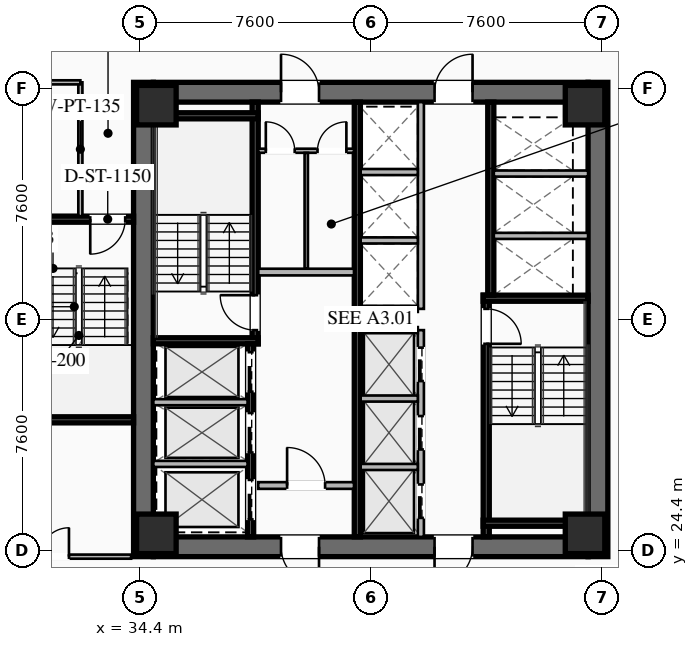
"""IFC4 building model, lengths in metres.
Left out: names, types, materials, properties, quantities, classifications, styles, units other than length and angle.
Written with IfcOpenShell. Run it as: python <this file> out.ifc"""

import sys

from ifc_helpers import new_model, si_unit, direction, frame, frame_2d, origin, origin_2d, place, context, subcontext, project, spatial, rectangle, hollow_rectangle, extrude, element, fill, save


model = new_model("IFC4")
c1 = context("Model", 3, precision=1e-05, world=origin(), true_north=direction((0.0, 1.0)))
c2 = subcontext(c1, "Body", "Model", "MODEL_VIEW")
j1 = project(units=[si_unit("LENGTHUNIT", "METRE"), si_unit("PLANEANGLEUNIT", "RADIAN")], contexts=[c1])
p1 = place(None, origin())
s1 = spatial("IfcSite", under=j1, at=p1, CompositionType="ELEMENT")
p2 = place(p1, origin())
s2 = spatial("IfcBuilding", under=s1, at=p2, CompositionType="ELEMENT")
p3 = place(p2, frame((0.0, 0.0, 95.6)))
s3 = spatial("IfcBuildingStorey", under=s2, at=p3, CompositionType="ELEMENT", Elevation=95.6)
for number, where, z_axis, x_axis in (
    (1, (34.525, 24.2, 0.0), (0.0, 0.0, 1.0), (0.0, 1.0, 0.0)),
    (2, (49.475, 39.8, 0.0), (0.0, 0.0, 1.0), (0.0, -1.0, 0.0)),
):
    element("IfcWall", number, at=place(p3, frame(where, z_axis=z_axis, x_axis=x_axis)), inside=s3, PredefinedType="SHEAR", context=c2, shape_type="SweptSolid", body=[
        extrude(rectangle(XDim=15.6, YDim=0.65, at=frame_2d((7.8, 0.0))), origin(), (0.0, 0.0, 1.0), 3.55),
    ])
p4 = place(p3, frame((49.15, 24.525, 0.0), z_axis=(0.0, 0.0, 1.0), x_axis=(-1.0, 0.0, 0.0)))
e3 = element("IfcWall", 3, at=p4, inside=s3, PredefinedType="SHEAR", context=c2, shape_type="SweptSolid", body=[
    extrude(rectangle(XDim=14.3, YDim=0.65, at=frame_2d((7.15, 0.0))), origin(), (0.0, 0.0, 1.0), 3.55),
])
p5 = place(p4, frame((8.85, 0.0, 0.0)))
e4 = element("IfcOpeningElement", 4, at=p5, cuts=e3, PredefinedType="OPENING", context=c2, shape_type="SweptSolid", body=[
    extrude(rectangle(XDim=1.25, YDim=2.25, at=frame_2d((0.625, 1.125))), frame((0.0, 0.335, 0.0), z_axis=(0.0, -1.0, 0.0), x_axis=(1.0, 0.0, 0.0)), (0.0, 0.0, 1.0), 0.67),
])
p6 = place(p4, frame((3.8, 0.0, 0.0)))
e5 = element("IfcOpeningElement", 5, at=p6, cuts=e3, PredefinedType="OPENING", context=c2, shape_type="SweptSolid", body=[
    extrude(rectangle(XDim=1.25, YDim=2.25, at=frame_2d((0.625, 1.125))), frame((0.0, 0.335, 0.0), z_axis=(0.0, -1.0, 0.0), x_axis=(1.0, 0.0, 0.0)), (0.0, 0.0, 1.0), 0.67),
])
p7 = place(p3, frame((34.85, 39.475, 0.0), z_axis=(0.0, 0.0, 1.0), x_axis=(1.0, 0.0, 0.0)))
e6 = element("IfcWall", 6, at=p7, inside=s3, PredefinedType="SHEAR", context=c2, shape_type="SweptSolid", body=[
    extrude(rectangle(XDim=14.3, YDim=0.65, at=frame_2d((7.15, 0.0))), origin(), (0.0, 0.0, 1.0), 3.55),
])
p8 = place(p7, frame((4.2, 0.0, 0.0)))
e7 = element("IfcOpeningElement", 7, at=p8, cuts=e6, PredefinedType="OPENING", context=c2, shape_type="SweptSolid", body=[
    extrude(rectangle(XDim=1.25, YDim=2.25, at=frame_2d((0.625, 1.125))), frame((0.0, 0.335, 0.0), z_axis=(0.0, -1.0, 0.0), x_axis=(1.0, 0.0, 0.0)), (0.0, 0.0, 1.0), 0.67),
])
p9 = place(p7, frame((9.25, 0.0, 0.0)))
e8 = element("IfcOpeningElement", 8, at=p9, cuts=e6, PredefinedType="OPENING", context=c2, shape_type="SweptSolid", body=[
    extrude(rectangle(XDim=1.25, YDim=2.25, at=frame_2d((0.625, 1.125))), frame((0.0, 0.335, 0.0), z_axis=(0.0, -1.0, 0.0), x_axis=(1.0, 0.0, 0.0)), (0.0, 0.0, 1.0), 0.67),
])
for number, where, z_axis, x_axis in (
    (9, (34.95, 24.95, 0.0), (0.0, 0.0, 1.0), (1.0, 0.0, 0.0)),
    (10, (49.05, 24.95, 0.0), (0.0, 0.0, 1.0), (1.0, 0.0, 0.0)),
    (11, (49.05, 39.05, 0.0), (0.0, 0.0, 1.0), (1.0, 0.0, 0.0)),
    (12, (34.95, 39.05, 0.0), (0.0, 0.0, 1.0), (1.0, 0.0, 0.0)),
):
    element("IfcColumn", number, at=place(p3, frame(where, z_axis=z_axis, x_axis=x_axis)), inside=s3, PredefinedType="COLUMN", context=c2, shape_type="SweptSolid", body=[
        extrude(hollow_rectangle(XDim=1.3, YDim=1.3, WallThickness=0.05, at=origin_2d()), origin(), (0.0, 0.0, 1.0), 3.35),
    ])
p10 = place(p3, frame((38.2, 31.2, 0.0), z_axis=(0.0, 0.0, 1.0), x_axis=(0.0, 1.0, 0.0)))
e13 = element("IfcWall", 13, at=p10, inside=s3, PredefinedType="SHEAR", context=c2, shape_type="SweptSolid", body=[
    extrude(rectangle(XDim=7.95, YDim=0.2, at=frame_2d((3.975, 0.0))), origin(), (0.0, 0.0, 1.0), 3.35),
])
p11 = place(p10, frame((0.45, 0.0, 0.0)))
e14 = element("IfcOpeningElement", 14, at=p11, cuts=e13, PredefinedType="OPENING", context=c2, shape_type="SweptSolid", body=[
    extrude(rectangle(XDim=1.15, YDim=2.2, at=frame_2d((0.575, 1.1))), frame((0.0, 0.11, 0.0), z_axis=(0.0, -1.0, 0.0), x_axis=(1.0, 0.0, 0.0)), (0.0, 0.0, 1.0), 0.22),
])
for number, where, z_axis, x_axis in (
    (15, (34.85, 31.3, 0.0), (0.0, 0.0, 1.0), (1.0, 0.0, 0.0)),
    (16, (34.85, 38.7, 0.0), (0.0, 0.0, 1.0), (1.0, 0.0, 0.0)),
):
    element("IfcWall", number, at=place(p3, frame(where, z_axis=z_axis, x_axis=x_axis)), inside=s3, PredefinedType="SHEAR", context=c2, shape_type="SweptSolid", body=[
        extrude(rectangle(XDim=3.45, YDim=0.2, at=frame_2d((1.725, 0.0))), origin(), (0.0, 0.0, 1.0), 3.35),
    ])
p12 = place(p3, frame((45.8, 32.8, 0.0), z_axis=(0.0, 0.0, 1.0), x_axis=(0.0, -1.0, 0.0)))
e17 = element("IfcWall", 17, at=p12, inside=s3, PredefinedType="SHEAR", context=c2, shape_type="SweptSolid", body=[
    extrude(rectangle(XDim=7.95, YDim=0.2, at=frame_2d((3.975, 0.0))), origin(), (0.0, 0.0, 1.0), 3.35),
])
p13 = place(p12, frame((0.45, 0.0, 0.0)))
e18 = element("IfcOpeningElement", 18, at=p13, cuts=e17, PredefinedType="OPENING", context=c2, shape_type="SweptSolid", body=[
    extrude(rectangle(XDim=1.15, YDim=2.2, at=frame_2d((0.575, 1.1))), frame((0.0, 0.11, 0.0), z_axis=(0.0, -1.0, 0.0), x_axis=(1.0, 0.0, 0.0)), (0.0, 0.0, 1.0), 0.22),
])
for number, where, z_axis, x_axis in (
    (19, (45.7, 32.7, 0.0), (0.0, 0.0, 1.0), (1.0, 0.0, 0.0)),
    (20, (45.7, 25.3, 0.0), (0.0, 0.0, 1.0), (1.0, 0.0, 0.0)),
):
    element("IfcWall", number, at=place(p3, frame(where, z_axis=z_axis, x_axis=x_axis)), inside=s3, PredefinedType="SHEAR", context=c2, shape_type="SweptSolid", body=[
        extrude(rectangle(XDim=3.45, YDim=0.2, at=frame_2d((1.725, 0.0))), origin(), (0.0, 0.0, 1.0), 3.35),
    ])
p14 = place(p3, frame((41.56, 24.85, 0.0), z_axis=(0.0, 0.0, 1.0), x_axis=(0.0, 1.0, 0.0)))
e21 = element("IfcWall", 21, at=p14, inside=s3, PredefinedType="SHEAR", context=c2, shape_type="SweptSolid", body=[
    extrude(rectangle(XDim=14.3, YDim=0.2, at=frame_2d((7.15, 0.0))), origin(), (0.0, 0.0, 1.0), 3.35),
])
p15 = place(p3, frame((38.3, 33.56, 0.0), z_axis=(0.0, 0.0, 1.0), x_axis=(1.0, 0.0, 0.0)))
e22 = element("IfcWall", 22, at=p15, inside=s3, PredefinedType="SOLIDWALL", context=c2, shape_type="SweptSolid", body=[
    extrude(rectangle(XDim=3.15, YDim=0.22, at=frame_2d((1.575, 0.0))), origin(), (0.0, 0.0, 1.0), 2.703),
])
p16 = place(p3, frame((38.3, 26.54, 0.0), z_axis=(0.0, 0.0, 1.0), x_axis=(1.0, 0.0, 0.0)))
e23 = element("IfcWall", 23, at=p16, inside=s3, PredefinedType="SOLIDWALL", context=c2, shape_type="SweptSolid", body=[
    extrude(rectangle(XDim=3.15, YDim=0.22, at=frame_2d((1.575, 0.0))), origin(), (0.0, 0.0, 1.0), 2.703),
])
p17 = place(p16, frame((0.95, 0.0, 0.0)))
e24 = element("IfcOpeningElement", 24, at=p17, cuts=e23, PredefinedType="OPENING", context=c2, shape_type="SweptSolid", body=[
    extrude(rectangle(XDim=1.25, YDim=2.25, at=frame_2d((0.625, 1.125))), frame((0.0, 0.12, 0.0), z_axis=(0.0, -1.0, 0.0), x_axis=(1.0, 0.0, 0.0)), (0.0, 0.0, 1.0), 0.24),
])
p18 = place(p3, frame((38.05, 24.85, 0.0), z_axis=(0.0, 0.0, 1.0), x_axis=(0.0, 1.0, 0.0)))
e25 = element("IfcWall", 25, at=p18, inside=s3, PredefinedType="SHEAR", context=c2, shape_type="SweptSolid", body=[
    extrude(rectangle(XDim=6.35, YDim=0.2, at=frame_2d((3.175, 0.0))), origin(), (0.0, 0.0, 1.0), 3.35),
])
p19 = place(p18, frame((4.775, 0.0, 0.0)))
e26 = element("IfcOpeningElement", 26, at=p19, cuts=e25, PredefinedType="OPENING", context=c2, shape_type="SweptSolid", body=[
    extrude(rectangle(XDim=1.3, YDim=2.25, at=frame_2d((0.65, 1.125))), frame((0.0, 0.11, 0.0), z_axis=(0.0, -1.0, 0.0), x_axis=(1.0, 0.0, 0.0)), (0.0, 0.0, 1.0), 0.22),
])
p20 = place(p18, frame((2.775, 0.0, 0.0)))
e27 = element("IfcOpeningElement", 27, at=p20, cuts=e25, PredefinedType="OPENING", context=c2, shape_type="SweptSolid", body=[
    extrude(rectangle(XDim=1.3, YDim=2.25, at=frame_2d((0.65, 1.125))), frame((0.0, 0.11, 0.0), z_axis=(0.0, -1.0, 0.0), x_axis=(1.0, 0.0, 0.0)), (0.0, 0.0, 1.0), 0.22),
])
p21 = place(p18, frame((0.575, 0.0, 0.0)))
e28 = element("IfcOpeningElement", 28, at=p21, cuts=e25, PredefinedType="OPENING", context=c2, shape_type="SweptSolid", body=[
    extrude(rectangle(XDim=1.3, YDim=2.25, at=frame_2d((0.65, 1.125))), frame((0.0, 0.11, 0.0), z_axis=(0.0, -1.0, 0.0), x_axis=(1.0, 0.0, 0.0)), (0.0, 0.0, 1.0), 0.22),
])
for number, where, z_axis, x_axis in (
    (29, (34.85, 27.25, 0.0), (0.0, 0.0, 1.0), (1.0, 0.0, 0.0)),
    (30, (34.85, 29.28, 0.0), (0.0, 0.0, 1.0), (1.0, 0.0, 0.0)),
):
    element("IfcWall", number, at=place(p3, frame(where, z_axis=z_axis, x_axis=x_axis)), inside=s3, PredefinedType="SOLIDWALL", context=c2, shape_type="SweptSolid", body=[
        extrude(rectangle(XDim=3.1, YDim=0.2, at=frame_2d((1.55, 0.0))), origin(), (0.0, 0.0, 1.0), 3.35),
    ])
p22 = place(p3, frame((45.95, 39.15, 0.0), z_axis=(0.0, 0.0, 1.0), x_axis=(0.0, -1.0, 0.0)))
e31 = element("IfcWall", 31, at=p22, inside=s3, PredefinedType="SHEAR", context=c2, shape_type="SweptSolid", body=[
    extrude(rectangle(XDim=6.35, YDim=0.2, at=frame_2d((3.175, 0.0))), origin(), (0.0, 0.0, 1.0), 3.35),
])
for number, where, z_axis, x_axis in (
    (32, (46.05, 34.75, 0.0), (0.0, 0.0, 1.0), (1.0, 0.0, 0.0)),
    (33, (46.05, 36.8, 0.0), (0.0, 0.0, 1.0), (1.0, 0.0, 0.0)),
):
    element("IfcWall", number, at=place(p3, frame(where, z_axis=z_axis, x_axis=x_axis)), inside=s3, PredefinedType="SOLIDWALL", context=c2, shape_type="SweptSolid", body=[
        extrude(rectangle(XDim=3.1, YDim=0.2, at=frame_2d((1.55, 0.0))), origin(), (0.0, 0.0, 1.0), 3.35),
    ])
p23 = place(p3, frame((38.3, 37.55, 0.0), z_axis=(0.0, 0.0, 1.0), x_axis=(1.0, 0.0, 0.0)))
e34 = element("IfcWall", 34, at=p23, inside=s3, PredefinedType="PARTITIONING", context=c2, shape_type="SweptSolid", body=[
    extrude(rectangle(XDim=3.15, YDim=0.135, at=frame_2d((1.575, 0.0))), origin(), (0.0, 0.0, 1.0), 2.703),
])
p24 = place(p23, frame((0.25, 0.0, 0.0)))
e35 = element("IfcOpeningElement", 35, at=p24, cuts=e34, PredefinedType="OPENING", context=c2, shape_type="SweptSolid", body=[
    extrude(rectangle(XDim=0.95, YDim=2.05, at=frame_2d((0.475, 1.025))), frame((0.0, 0.077, 0.0), z_axis=(0.0, -1.0, 0.0), x_axis=(1.0, 0.0, 0.0)), (0.0, 0.0, 1.0), 0.155),
])
p25 = place(p23, frame((1.95, 0.0, 0.0)))
e36 = element("IfcOpeningElement", 36, at=p25, cuts=e34, PredefinedType="OPENING", context=c2, shape_type="SweptSolid", body=[
    extrude(rectangle(XDim=0.95, YDim=2.05, at=frame_2d((0.475, 1.025))), frame((0.0, 0.077, 0.0), z_axis=(0.0, -1.0, 0.0), x_axis=(1.0, 0.0, 0.0)), (0.0, 0.0, 1.0), 0.155),
])
p26 = place(p3, frame((39.88, 33.68, 0.0), z_axis=(0.0, 0.0, 1.0), x_axis=(0.0, 1.0, 0.0)))
e37 = element("IfcWall", 37, at=p26, inside=s3, PredefinedType="PARTITIONING", context=c2, shape_type="SweptSolid", body=[
    extrude(rectangle(XDim=3.8, YDim=0.11, at=frame_2d((1.9, 0.0))), origin(), (0.0, 0.0, 1.0), 2.703),
])
p27 = place(p3, frame((43.65, 24.85, 0.0), z_axis=(0.0, 0.0, 1.0), x_axis=(0.0, 1.0, 0.0)))
e38 = element("IfcWall", 38, at=p27, inside=s3, PredefinedType="SOLIDWALL", context=c2, shape_type="SweptSolid", body=[
    extrude(rectangle(XDim=6.8, YDim=0.2, at=frame_2d((3.4, 0.0))), origin(), (0.0, 0.0, 1.0), 3.35),
])
p28 = place(p27, frame((0.625, 0.0, 0.0)))
e39 = element("IfcOpeningElement", 39, at=p28, cuts=e38, PredefinedType="OPENING", context=c2, shape_type="SweptSolid", body=[
    extrude(rectangle(XDim=1.1, YDim=2.2, at=frame_2d((0.55, 1.1))), frame((0.0, 0.11, 0.0), z_axis=(0.0, -1.0, 0.0), x_axis=(1.0, 0.0, 0.0)), (0.0, 0.0, 1.0), 0.22),
])
p29 = place(p27, frame((2.875, 0.0, 0.0)))
e40 = element("IfcOpeningElement", 40, at=p29, cuts=e38, PredefinedType="OPENING", context=c2, shape_type="SweptSolid", body=[
    extrude(rectangle(XDim=1.1, YDim=2.2, at=frame_2d((0.55, 1.1))), frame((0.0, 0.11, 0.0), z_axis=(0.0, -1.0, 0.0), x_axis=(1.0, 0.0, 0.0)), (0.0, 0.0, 1.0), 0.22),
])
p30 = place(p27, frame((5.125, 0.0, 0.0)))
e41 = element("IfcOpeningElement", 41, at=p30, cuts=e38, PredefinedType="OPENING", context=c2, shape_type="SweptSolid", body=[
    extrude(rectangle(XDim=1.1, YDim=2.2, at=frame_2d((0.55, 1.1))), frame((0.0, 0.11, 0.0), z_axis=(0.0, -1.0, 0.0), x_axis=(1.0, 0.0, 0.0)), (0.0, 0.0, 1.0), 0.22),
])
for number, where, z_axis, x_axis in (
    (42, (41.67, 27.15, 0.0), (0.0, 0.0, 1.0), (1.0, 0.0, 0.0)),
    (43, (41.67, 29.4, 0.0), (0.0, 0.0, 1.0), (1.0, 0.0, 0.0)),
    (44, (41.67, 31.65, 0.0), (0.0, 0.0, 1.0), (1.0, 0.0, 0.0)),
):
    element("IfcWall", number, at=place(p3, frame(where, z_axis=z_axis, x_axis=x_axis)), inside=s3, PredefinedType="SOLIDWALL", context=c2, shape_type="SweptSolid", body=[
        extrude(rectangle(XDim=1.88, YDim=0.2, at=frame_2d((0.94, 0.0))), origin(), (0.0, 0.0, 1.0), 3.35),
    ])
p31 = place(p3, frame((43.65, 32.35, 0.0), z_axis=(0.0, 0.0, 1.0), x_axis=(0.0, 1.0, 0.0)))
e45 = element("IfcWall", 45, at=p31, inside=s3, PredefinedType="SOLIDWALL", context=c2, shape_type="SweptSolid", body=[
    extrude(rectangle(XDim=6.8, YDim=0.2, at=frame_2d((3.4, 0.0))), origin(), (0.0, 0.0, 1.0), 3.35),
])
for number, where, z_axis, x_axis in (
    (46, (41.67, 32.35, 0.0), (0.0, 0.0, 1.0), (1.0, 0.0, 0.0)),
    (47, (41.67, 34.6, 0.0), (0.0, 0.0, 1.0), (1.0, 0.0, 0.0)),
    (48, (41.67, 36.85, 0.0), (0.0, 0.0, 1.0), (1.0, 0.0, 0.0)),
):
    element("IfcWall", number, at=place(p3, frame(where, z_axis=z_axis, x_axis=x_axis)), inside=s3, PredefinedType="SOLIDWALL", context=c2, shape_type="SweptSolid", body=[
        extrude(rectangle(XDim=1.88, YDim=0.2, at=frame_2d((0.94, 0.0))), origin(), (0.0, 0.0, 1.0), 3.35),
    ])
p32 = place(p3, frame((34.2, 35.3, 0.0), z_axis=(0.0, 0.0, 1.0), x_axis=(-1.0, 0.0, 0.0)))
e49 = element("IfcWall", 49, at=p32, inside=s3, PredefinedType="SHEAR", context=c2, shape_type="SweptSolid", body=[
    extrude(rectangle(XDim=3.4, YDim=0.2, at=frame_2d((1.7, 0.0))), origin(), (0.0, 0.0, 1.0), 3.35),
])
p33 = place(p32, frame((0.275, 0.0, 0.0)))
e50 = element("IfcOpeningElement", 50, at=p33, cuts=e49, PredefinedType="OPENING", context=c2, shape_type="SweptSolid", body=[
    extrude(rectangle(XDim=1.15, YDim=2.2, at=frame_2d((0.575, 1.1))), frame((0.0, 0.11, 0.0), z_axis=(0.0, -1.0, 0.0), x_axis=(1.0, 0.0, 0.0)), (0.0, 0.0, 1.0), 0.22),
])
p34 = place(p3, frame((30.8, 28.7, 0.0), z_axis=(0.0, 0.0, 1.0), x_axis=(1.0, 0.0, 0.0)))
e51 = element("IfcWall", 51, at=p34, inside=s3, PredefinedType="SHEAR", context=c2, shape_type="SweptSolid", body=[
    extrude(rectangle(XDim=3.4, YDim=0.2, at=frame_2d((1.7, 0.0))), origin(), (0.0, 0.0, 1.0), 3.35),
])
p35 = place(p3, frame((32.45, 35.4, 0.0), z_axis=(0.0, 0.0, 1.0), x_axis=(0.0, 1.0, 0.0)))
e52 = element("IfcWall", 52, at=p35, inside=s3, PredefinedType="PARTITIONING", context=c2, shape_type="SweptSolid", body=[
    extrude(rectangle(XDim=4.4, YDim=0.135, at=frame_2d((2.2, 0.0))), origin(), (0.0, 0.0, 1.0), 2.703),
])
p36 = place(p3, frame((32.45, 39.8, 0.0), z_axis=(0.0, 0.0, 1.0), x_axis=(-1.0, 0.0, 0.0)))
e53 = element("IfcWall", 53, at=p36, inside=s3, PredefinedType="PARTITIONING", context=c2, shape_type="SweptSolid", body=[
    extrude(rectangle(XDim=11.43, YDim=0.135, at=frame_2d((5.715, 0.0))), origin(), (0.0, 0.0, 1.0), 2.703),
])
p37 = place(p36, frame((4.89, 0.0, 0.0)))
e54 = element("IfcOpeningElement", 54, at=p37, cuts=e53, PredefinedType="OPENING", context=c2, shape_type="SweptSolid", body=[
    extrude(rectangle(XDim=0.95, YDim=2.05, at=frame_2d((0.475, 1.025))), frame((0.0, 0.077, 0.0), z_axis=(0.0, -1.0, 0.0), x_axis=(1.0, 0.0, 0.0)), (0.0, 0.0, 1.0), 0.155),
])
p38 = place(p3, frame((21.02, 24.2, 0.0), z_axis=(0.0, 0.0, 1.0), x_axis=(1.0, 0.0, 0.0)))
e55 = element("IfcWall", 55, at=p38, inside=s3, PredefinedType="PARTITIONING", context=c2, shape_type="SweptSolid", body=[
    extrude(rectangle(XDim=13.1, YDim=0.135, at=frame_2d((6.55, 0.0))), origin(), (0.0, 0.0, 1.0), 2.703),
])
p39 = place(p38, frame((10.105, 0.0, 0.0)))
e56 = element("IfcOpeningElement", 56, at=p39, cuts=e55, PredefinedType="OPENING", context=c2, shape_type="SweptSolid", body=[
    extrude(rectangle(XDim=0.95, YDim=2.05, at=frame_2d((0.475, 1.025))), frame((0.0, 0.077, 0.0), z_axis=(0.0, -1.0, 0.0), x_axis=(1.0, 0.0, 0.0)), (0.0, 0.0, 1.0), 0.155),
])
p40 = place(p8, origin())
e57 = element("IfcDoor", 57, at=p40, inside=s3, OperationType="SINGLE_SWING_LEFT", PredefinedType="DOOR", context=c2, shape_type="SweptSolid", body=[
    extrude(rectangle(XDim=1.25, YDim=2.25, at=frame_2d((0.625, 1.125))), frame((0.0, 0.025, 0.0), z_axis=(0.0, -1.0, 0.0), x_axis=(1.0, 0.0, 0.0)), (0.0, 0.0, 1.0), 0.05),
])
fill(e7, e57)
p41 = place(p9, origin())
e58 = element("IfcDoor", 58, at=p41, inside=s3, OperationType="SINGLE_SWING_RIGHT", PredefinedType="DOOR", context=c2, shape_type="SweptSolid", body=[
    extrude(rectangle(XDim=1.25, YDim=2.25, at=frame_2d((0.625, 1.125))), frame((0.0, 0.025, 0.0), z_axis=(0.0, -1.0, 0.0), x_axis=(1.0, 0.0, 0.0)), (0.0, 0.0, 1.0), 0.05),
])
fill(e8, e58)
p42 = place(p5, origin())
e59 = element("IfcDoor", 59, at=p42, inside=s3, OperationType="SINGLE_SWING_LEFT", PredefinedType="DOOR", context=c2, shape_type="SweptSolid", body=[
    extrude(rectangle(XDim=1.25, YDim=2.25, at=frame_2d((0.625, 1.125))), frame((0.0, 0.025, 0.0), z_axis=(0.0, -1.0, 0.0), x_axis=(1.0, 0.0, 0.0)), (0.0, 0.0, 1.0), 0.05),
])
fill(e4, e59)
p43 = place(p6, origin())
e60 = element("IfcDoor", 60, at=p43, inside=s3, OperationType="SINGLE_SWING_RIGHT", PredefinedType="DOOR", context=c2, shape_type="SweptSolid", body=[
    extrude(rectangle(XDim=1.25, YDim=2.25, at=frame_2d((0.625, 1.125))), frame((0.0, 0.025, 0.0), z_axis=(0.0, -1.0, 0.0), x_axis=(1.0, 0.0, 0.0)), (0.0, 0.0, 1.0), 0.05),
])
fill(e5, e60)
p44 = place(p11, origin())
e61 = element("IfcDoor", 61, at=p44, inside=s3, OperationType="SINGLE_SWING_RIGHT", PredefinedType="DOOR", context=c2, shape_type="SweptSolid", body=[
    extrude(rectangle(XDim=1.15, YDim=2.2, at=frame_2d((0.575, 1.1))), frame((0.0, 0.025, 0.0), z_axis=(0.0, -1.0, 0.0), x_axis=(1.0, 0.0, 0.0)), (0.0, 0.0, 1.0), 0.05),
])
fill(e14, e61)
p45 = place(p13, origin())
e62 = element("IfcDoor", 62, at=p45, inside=s3, OperationType="SINGLE_SWING_RIGHT", PredefinedType="DOOR", context=c2, shape_type="SweptSolid", body=[
    extrude(rectangle(XDim=1.15, YDim=2.2, at=frame_2d((0.575, 1.1))), frame((0.0, 0.025, 0.0), z_axis=(0.0, -1.0, 0.0), x_axis=(1.0, 0.0, 0.0)), (0.0, 0.0, 1.0), 0.05),
])
fill(e18, e62)
p46 = place(p17, origin())
e63 = element("IfcDoor", 63, at=p46, inside=s3, OperationType="SINGLE_SWING_LEFT", PredefinedType="DOOR", context=c2, shape_type="SweptSolid", body=[
    extrude(rectangle(XDim=1.25, YDim=2.25, at=frame_2d((0.625, 1.125))), frame((0.0, 0.025, 0.0), z_axis=(0.0, -1.0, 0.0), x_axis=(1.0, 0.0, 0.0)), (0.0, 0.0, 1.0), 0.05),
])
fill(e24, e63)
p47 = place(p24, origin())
e64 = element("IfcDoor", 64, at=p47, inside=s3, OperationType="SINGLE_SWING_LEFT", PredefinedType="DOOR", context=c2, shape_type="SweptSolid", body=[
    extrude(rectangle(XDim=0.95, YDim=2.05, at=frame_2d((0.475, 1.025))), frame((0.0, 0.025, 0.0), z_axis=(0.0, -1.0, 0.0), x_axis=(1.0, 0.0, 0.0)), (0.0, 0.0, 1.0), 0.05),
])
fill(e35, e64)
p48 = place(p25, origin())
e65 = element("IfcDoor", 65, at=p48, inside=s3, OperationType="SINGLE_SWING_RIGHT", PredefinedType="DOOR", context=c2, shape_type="SweptSolid", body=[
    extrude(rectangle(XDim=0.95, YDim=2.05, at=frame_2d((0.475, 1.025))), frame((0.0, 0.025, 0.0), z_axis=(0.0, -1.0, 0.0), x_axis=(1.0, 0.0, 0.0)), (0.0, 0.0, 1.0), 0.05),
])
fill(e36, e65)
p49 = place(p33, origin())
e66 = element("IfcDoor", 66, at=p49, inside=s3, OperationType="SINGLE_SWING_RIGHT", PredefinedType="DOOR", context=c2, shape_type="SweptSolid", body=[
    extrude(rectangle(XDim=1.15, YDim=2.2, at=frame_2d((0.575, 1.1))), frame((0.0, 0.025, 0.0), z_axis=(0.0, -1.0, 0.0), x_axis=(1.0, 0.0, 0.0)), (0.0, 0.0, 1.0), 0.05),
])
fill(e50, e66)
p50 = place(p39, origin())
e67 = element("IfcDoor", 67, at=p50, inside=s3, OperationType="SINGLE_SWING_RIGHT", PredefinedType="DOOR", context=c2, shape_type="SweptSolid", body=[
    extrude(rectangle(XDim=0.95, YDim=2.05, at=frame_2d((0.475, 1.025))), frame((0.0, 0.025, 0.0), z_axis=(0.0, -1.0, 0.0), x_axis=(1.0, 0.0, 0.0)), (0.0, 0.0, 1.0), 0.05),
])
fill(e56, e67)
p51 = place(p19, origin())
e68 = element("IfcDoor", 68, at=p51, inside=s3, OperationType="SLIDING_TO_LEFT", PredefinedType="DOOR", context=c2, shape_type="SweptSolid", body=[
    extrude(rectangle(XDim=1.3, YDim=2.25, at=frame_2d((0.65, 1.125))), frame((0.0, 0.025, 0.0), z_axis=(0.0, -1.0, 0.0), x_axis=(1.0, 0.0, 0.0)), (0.0, 0.0, 1.0), 0.05),
])
fill(e26, e68)
p52 = place(p20, origin())
e69 = element("IfcDoor", 69, at=p52, inside=s3, OperationType="SLIDING_TO_LEFT", PredefinedType="DOOR", context=c2, shape_type="SweptSolid", body=[
    extrude(rectangle(XDim=1.3, YDim=2.25, at=frame_2d((0.65, 1.125))), frame((0.0, 0.025, 0.0), z_axis=(0.0, -1.0, 0.0), x_axis=(1.0, 0.0, 0.0)), (0.0, 0.0, 1.0), 0.05),
])
fill(e27, e69)
p53 = place(p21, origin())
e70 = element("IfcDoor", 70, at=p53, inside=s3, OperationType="SLIDING_TO_LEFT", PredefinedType="DOOR", context=c2, shape_type="SweptSolid", body=[
    extrude(rectangle(XDim=1.3, YDim=2.25, at=frame_2d((0.65, 1.125))), frame((0.0, 0.025, 0.0), z_axis=(0.0, -1.0, 0.0), x_axis=(1.0, 0.0, 0.0)), (0.0, 0.0, 1.0), 0.05),
])
fill(e28, e70)
p54 = place(p28, origin())
e71 = element("IfcDoor", 71, at=p54, inside=s3, OperationType="SLIDING_TO_LEFT", PredefinedType="DOOR", context=c2, shape_type="SweptSolid", body=[
    extrude(rectangle(XDim=1.1, YDim=2.2, at=frame_2d((0.55, 1.1))), frame((0.0, 0.025, 0.0), z_axis=(0.0, -1.0, 0.0), x_axis=(1.0, 0.0, 0.0)), (0.0, 0.0, 1.0), 0.05),
])
fill(e39, e71)
p55 = place(p29, origin())
e72 = element("IfcDoor", 72, at=p55, inside=s3, OperationType="SLIDING_TO_LEFT", PredefinedType="DOOR", context=c2, shape_type="SweptSolid", body=[
    extrude(rectangle(XDim=1.1, YDim=2.2, at=frame_2d((0.55, 1.1))), frame((0.0, 0.025, 0.0), z_axis=(0.0, -1.0, 0.0), x_axis=(1.0, 0.0, 0.0)), (0.0, 0.0, 1.0), 0.05),
])
fill(e40, e72)
p56 = place(p30, origin())
e73 = element("IfcDoor", 73, at=p56, inside=s3, OperationType="SLIDING_TO_LEFT", PredefinedType="DOOR", context=c2, shape_type="SweptSolid", body=[
    extrude(rectangle(XDim=1.1, YDim=2.2, at=frame_2d((0.55, 1.1))), frame((0.0, 0.025, 0.0), z_axis=(0.0, -1.0, 0.0), x_axis=(1.0, 0.0, 0.0)), (0.0, 0.0, 1.0), 0.05),
])
fill(e41, e73)
save(model, sys.argv[1])
